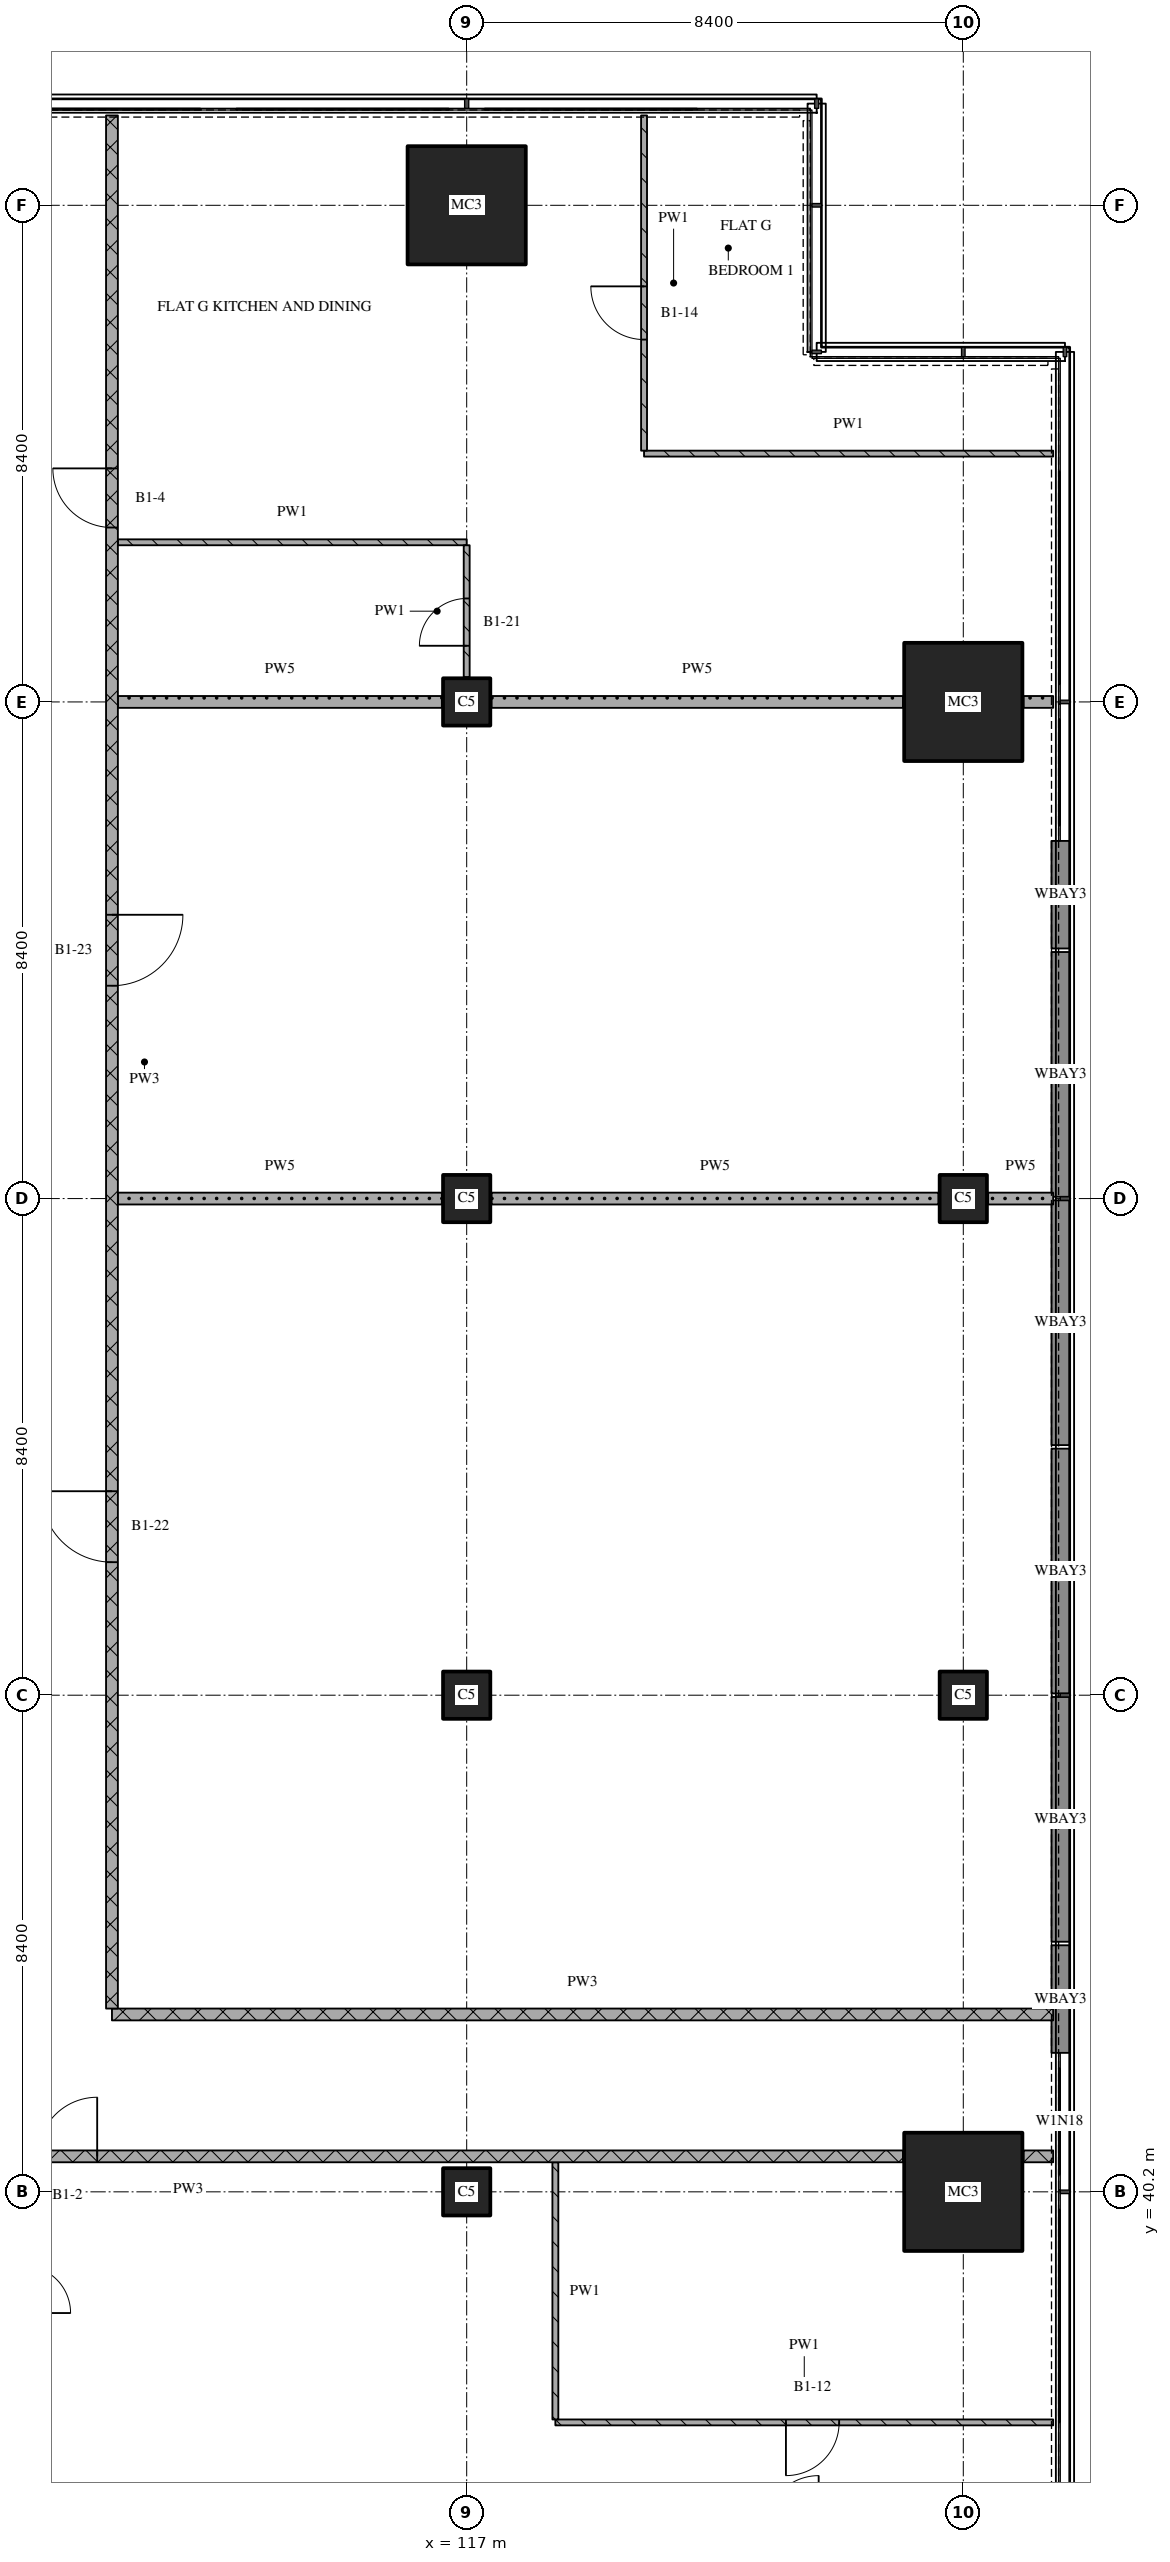
"""IFC4 building model, lengths in metres.
Left out: names, types, materials, properties, quantities, classifications, styles, units other than length and angle.
Written with IfcOpenShell. Run it as: python <this file> out.ifc"""

import sys

from ifc_helpers import new_model, si_unit, direction, frame, frame_2d, origin, origin_2d, place, context, subcontext, project, spatial, rectangle, extrude, element, fill, save


model = new_model("IFC4")
c1 = context("Model", 3, precision=1e-05, world=origin(), true_north=direction((0.0, 1.0)))
c2 = subcontext(c1, "Body", "Model", "MODEL_VIEW")
j1 = project(units=[si_unit("LENGTHUNIT", "METRE"), si_unit("PLANEANGLEUNIT", "RADIAN")], contexts=[c1])
p1 = place(None, origin())
s1 = spatial("IfcSite", under=j1, at=p1, CompositionType="ELEMENT")
p2 = place(p1, origin())
s2 = spatial("IfcBuilding", under=s1, at=p2, CompositionType="ELEMENT")
p3 = place(p2, frame((0.0, 0.0, 95.25)))
s3 = spatial("IfcBuildingStorey", under=s2, at=p3, CompositionType="ELEMENT", Elevation=95.25)
for number, where, z_axis, x_axis in (
    (1, (117.0, 40.2, 0.0), (0.0, 0.0, 1.0), (1.0, 0.0, 0.0)),
    (2, (117.0, 48.6, 0.0), (0.0, 0.0, 1.0), (1.0, 0.0, 0.0)),
    (3, (117.0, 57.0, 0.0), (0.0, 0.0, 1.0), (1.0, 0.0, 0.0)),
    (4, (117.0, 65.4, 0.0), (0.0, 0.0, 1.0), (1.0, 0.0, 0.0)),
):
    element("IfcColumn", number, at=place(p3, frame(where, z_axis=z_axis, x_axis=x_axis)), inside=s3, PredefinedType="COLUMN", context=c2, shape_type="SweptSolid", body=[
        extrude(rectangle(XDim=0.8, YDim=0.8, at=origin_2d()), origin(), (0.0, 0.0, 1.0), 3.6),
    ])
for number, where, z_axis, x_axis in (
    (5, (117.0, 73.8, 0.0), (0.0, 0.0, 1.0), (1.0, 0.0, 0.0)),
    (6, (125.4, 40.2, 0.0), (0.0, 0.0, 1.0), (1.0, 0.0, 0.0)),
):
    element("IfcColumn", number, at=place(p3, frame(where, z_axis=z_axis, x_axis=x_axis)), inside=s3, PredefinedType="COLUMN", context=c2, shape_type="SweptSolid", body=[
        extrude(rectangle(XDim=2.0, YDim=2.0, at=origin_2d()), origin(), (0.0, 0.0, 1.0), 3.6),
    ])
for number, where, z_axis, x_axis in (
    (7, (125.4, 48.6, 0.0), (0.0, 0.0, 1.0), (1.0, 0.0, 0.0)),
    (8, (125.4, 57.0, 0.0), (0.0, 0.0, 1.0), (1.0, 0.0, 0.0)),
):
    element("IfcColumn", number, at=place(p3, frame(where, z_axis=z_axis, x_axis=x_axis)), inside=s3, PredefinedType="COLUMN", context=c2, shape_type="SweptSolid", body=[
        extrude(rectangle(XDim=0.8, YDim=0.8, at=origin_2d()), origin(), (0.0, 0.0, 1.0), 3.6),
    ])
p4 = place(p3, frame((125.4, 65.4, 0.0), z_axis=(0.0, 0.0, 1.0), x_axis=(1.0, 0.0, 0.0)))
e9 = element("IfcColumn", 9, at=p4, inside=s3, PredefinedType="COLUMN", context=c2, shape_type="SweptSolid", body=[
    extrude(rectangle(XDim=2.0, YDim=2.0, at=origin_2d()), origin(), (0.0, 0.0, 1.0), 3.6),
])
p5 = place(p3, frame((127.046, 44.37, 0.0), z_axis=(0.0, 0.0, 1.0), x_axis=(0.0, -1.0, 0.0)))
e10 = element("IfcWall", 10, at=p5, inside=s3, PredefinedType="SOLIDWALL", context=c2, shape_type="SweptSolid", body=[
    extrude(rectangle(XDim=1.819, YDim=0.308, at=frame_2d((0.91, 0.0))), origin(), (0.0, 0.0, 1.0), 3.2),
])
for number, where, z_axis, x_axis in (
    (11, (127.046, 48.57, 0.0), (0.0, 0.0, 1.0), (0.0, -1.0, 0.0)),
    (12, (127.046, 52.77, 0.0), (0.0, 0.0, 1.0), (0.0, -1.0, 0.0)),
):
    element("IfcWall", number, at=place(p3, frame(where, z_axis=z_axis, x_axis=x_axis)), inside=s3, PredefinedType="SOLIDWALL", context=c2, shape_type="SweptSolid", body=[
        extrude(rectangle(XDim=4.14, YDim=0.308, at=frame_2d((2.07, 0.0))), origin(), (0.0, 0.0, 1.0), 3.2),
    ])
for number, where, z_axis, x_axis in (
    (13, (127.046, 56.97, 0.0), (0.0, 0.0, 1.0), (0.0, -1.0, 0.0)),
    (14, (127.046, 61.17, 0.0), (0.0, 0.0, 1.0), (0.0, -1.0, 0.0)),
):
    element("IfcWall", number, at=place(p3, frame(where, z_axis=z_axis, x_axis=x_axis)), inside=s3, PredefinedType="SOLIDWALL", context=c2, shape_type="SweptSolid", body=[
        extrude(rectangle(XDim=4.14, YDim=0.308, at=frame_2d((2.07, 0.0))), origin(), (0.0, 0.0, 1.0), 3.2),
    ])
p6 = place(p3, frame((127.046, 63.049, 0.0), z_axis=(0.0, 0.0, 1.0), x_axis=(0.0, -1.0, 0.0)))
e15 = element("IfcWall", 15, at=p6, inside=s3, PredefinedType="SOLIDWALL", context=c2, shape_type="SweptSolid", body=[
    extrude(rectangle(XDim=1.819, YDim=0.308, at=frame_2d((0.91, 0.0))), origin(), (0.0, 0.0, 1.0), 3.2),
])
p7 = place(p3, frame((118.5, 36.3, 0.0), z_axis=(0.0, 0.0, 1.0), x_axis=(1.0, 0.0, 0.0)))
e16 = element("IfcWall", 16, at=p7, inside=s3, PredefinedType="PARTITIONING", context=c2, shape_type="SweptSolid", body=[
    extrude(rectangle(XDim=8.42, YDim=0.1, at=frame_2d((4.21, 0.0))), origin(), (0.0, 0.0, 1.0), 3.32),
])
p8 = place(p7, frame((3.9, 0.0, 0.0)))
e17 = element("IfcOpeningElement", 17, at=p8, cuts=e16, PredefinedType="OPENING", context=c2, shape_type="SweptSolid", body=[
    extrude(rectangle(XDim=0.9, YDim=2.1, at=frame_2d((0.45, 1.05))), frame((0.0, 0.06, 0.0), z_axis=(0.0, -1.0, 0.0), x_axis=(1.0, 0.0, 0.0)), (0.0, 0.0, 1.0), 0.12),
])
p9 = place(p3, frame((124.38, 40.8, 0.0), z_axis=(0.0, 0.0, 1.0), x_axis=(-1.0, 0.0, 0.0)))
e18 = element("IfcWall", 18, at=p9, inside=s3, PredefinedType="PARTITIONING", context=c2, shape_type="SweptSolid", body=[
    extrude(rectangle(XDim=24.18, YDim=0.2, at=frame_2d((12.09, 0.0))), origin(), (0.0, 0.0, 1.0), 3.32),
])
p10 = place(p9, frame((13.63, 0.0, 0.0)))
e19 = element("IfcOpeningElement", 19, at=p10, cuts=e18, PredefinedType="OPENING", context=c2, shape_type="SweptSolid", body=[
    extrude(rectangle(XDim=1.0, YDim=2.1, at=frame_2d((0.5, 1.05))), frame((0.0, 0.11, 0.0), z_axis=(0.0, -1.0, 0.0), x_axis=(1.0, 0.0, 0.0)), (0.0, 0.0, 1.0), 0.22),
])
p11 = place(p3, frame((126.42, 40.8, 0.0), z_axis=(0.0, 0.0, 1.0), x_axis=(1.0, 0.0, 0.0)))
e20 = element("IfcWall", 20, at=p11, inside=s3, PredefinedType="PARTITIONING", context=c2, shape_type="SweptSolid", body=[
    extrude(rectangle(XDim=0.5, YDim=0.2, at=frame_2d((0.25, 0.0))), origin(), (0.0, 0.0, 1.0), 3.32),
])
p12 = place(p3, frame((111.0, 43.2, 0.0), z_axis=(0.0, 0.0, 1.0), x_axis=(1.0, 0.0, 0.0)))
e21 = element("IfcWall", 21, at=p12, inside=s3, PredefinedType="PARTITIONING", context=c2, shape_type="SweptSolid", body=[
    extrude(rectangle(XDim=15.92, YDim=0.2, at=frame_2d((7.96, 0.0))), origin(), (0.0, 0.0, 1.0), 3.32),
])
p13 = place(p3, frame((111.1, 57.0, 0.0), z_axis=(0.0, 0.0, 1.0), x_axis=(1.0, 0.0, 0.0)))
e22 = element("IfcWall", 22, at=p13, inside=s3, PredefinedType="PARTITIONING", context=c2, shape_type="SweptSolid", body=[
    extrude(rectangle(XDim=5.48, YDim=0.2, at=frame_2d((2.74, 0.0))), origin(), (0.0, 0.0, 1.0), 3.32),
])
p14 = place(p3, frame((117.42, 57.0, 0.0), z_axis=(0.0, 0.0, 1.0), x_axis=(1.0, 0.0, 0.0)))
e23 = element("IfcWall", 23, at=p14, inside=s3, PredefinedType="PARTITIONING", context=c2, shape_type="SweptSolid", body=[
    extrude(rectangle(XDim=7.56, YDim=0.2, at=frame_2d((3.78, 0.0))), origin(), (0.0, 0.0, 1.0), 3.32),
])
p15 = place(p3, frame((125.82, 57.0, 0.0), z_axis=(0.0, 0.0, 1.0), x_axis=(1.0, 0.0, 0.0)))
e24 = element("IfcWall", 24, at=p15, inside=s3, PredefinedType="PARTITIONING", context=c2, shape_type="SweptSolid", body=[
    extrude(rectangle(XDim=1.1, YDim=0.2, at=frame_2d((0.55, 0.0))), origin(), (0.0, 0.0, 1.0), 3.32),
])
p16 = place(p3, frame((111.1, 65.4, 0.0), z_axis=(0.0, 0.0, 1.0), x_axis=(1.0, 0.0, 0.0)))
e25 = element("IfcWall", 25, at=p16, inside=s3, PredefinedType="PARTITIONING", context=c2, shape_type="SweptSolid", body=[
    extrude(rectangle(XDim=5.48, YDim=0.2, at=frame_2d((2.74, 0.0))), origin(), (0.0, 0.0, 1.0), 2.82),
])
p17 = place(p3, frame((117.42, 65.4, 0.0), z_axis=(0.0, 0.0, 1.0), x_axis=(1.0, 0.0, 0.0)))
e26 = element("IfcWall", 26, at=p17, inside=s3, PredefinedType="PARTITIONING", context=c2, shape_type="SweptSolid", body=[
    extrude(rectangle(XDim=6.96, YDim=0.2, at=frame_2d((3.48, 0.0))), origin(), (0.0, 0.0, 1.0), 3.32),
])
p18 = place(p3, frame((126.42, 65.4, 0.0), z_axis=(0.0, 0.0, 1.0), x_axis=(1.0, 0.0, 0.0)))
e27 = element("IfcWall", 27, at=p18, inside=s3, PredefinedType="PARTITIONING", context=c2, shape_type="SweptSolid", body=[
    extrude(rectangle(XDim=0.5, YDim=0.2, at=frame_2d((0.25, 0.0))), origin(), (0.0, 0.0, 1.0), 3.32),
])
p19 = place(p3, frame((111.1, 68.1, 0.0), z_axis=(0.0, 0.0, 1.0), x_axis=(1.0, 0.0, 0.0)))
e28 = element("IfcWall", 28, at=p19, inside=s3, PredefinedType="PARTITIONING", context=c2, shape_type="SweptSolid", body=[
    extrude(rectangle(XDim=5.9, YDim=0.1, at=frame_2d((2.95, 0.0))), origin(), (0.0, 0.0, 1.0), 3.32),
])
p20 = place(p3, frame((120.0, 69.6, 0.0), z_axis=(0.0, 0.0, 1.0), x_axis=(1.0, 0.0, 0.0)))
e29 = element("IfcWall", 29, at=p20, inside=s3, PredefinedType="PARTITIONING", context=c2, shape_type="SweptSolid", body=[
    extrude(rectangle(XDim=6.92, YDim=0.1, at=frame_2d((3.46, 0.0))), origin(), (0.0, 0.0, 1.0), 3.32),
])
p21 = place(p3, frame((111.0, 75.32, 0.0), z_axis=(0.0, 0.0, 1.0), x_axis=(0.0, -1.0, 0.0)))
e30 = element("IfcWall", 30, at=p21, inside=s3, PredefinedType="PARTITIONING", context=c2, shape_type="SweptSolid", body=[
    extrude(rectangle(XDim=32.02, YDim=0.2, at=frame_2d((16.01, 0.0))), origin(), (0.0, 0.0, 1.0), 3.32),
])
p22 = place(p21, frame((5.97, 0.0, 0.0)))
e31 = element("IfcOpeningElement", 31, at=p22, cuts=e30, PredefinedType="OPENING", context=c2, shape_type="SweptSolid", body=[
    extrude(rectangle(XDim=1.0, YDim=2.1, at=frame_2d((0.5, 1.05))), frame((0.0, 0.11, 0.0), z_axis=(0.0, -1.0, 0.0), x_axis=(1.0, 0.0, 0.0)), (0.0, 0.0, 1.0), 0.22),
])
p23 = place(p21, frame((13.52, 0.0, 0.0)))
e32 = element("IfcOpeningElement", 32, at=p23, cuts=e30, PredefinedType="OPENING", context=c2, shape_type="SweptSolid", body=[
    extrude(rectangle(XDim=1.2, YDim=2.1, at=frame_2d((0.6, 1.05))), frame((0.0, 0.11, 0.0), z_axis=(0.0, -1.0, 0.0), x_axis=(1.0, 0.0, 0.0)), (0.0, 0.0, 1.0), 0.22),
])
p24 = place(p21, frame((23.27, 0.0, 0.0)))
e33 = element("IfcOpeningElement", 33, at=p24, cuts=e30, PredefinedType="OPENING", context=c2, shape_type="SweptSolid", body=[
    extrude(rectangle(XDim=1.2, YDim=2.1, at=frame_2d((0.6, 1.05))), frame((0.0, 0.11, 0.0), z_axis=(0.0, -1.0, 0.0), x_axis=(1.0, 0.0, 0.0)), (0.0, 0.0, 1.0), 0.22),
])
p25 = place(p3, frame((117.0, 65.82, 0.0), z_axis=(0.0, 0.0, 1.0), x_axis=(0.0, 1.0, 0.0)))
e34 = element("IfcWall", 34, at=p25, inside=s3, PredefinedType="PARTITIONING", context=c2, shape_type="SweptSolid", body=[
    extrude(rectangle(XDim=2.23, YDim=0.1, at=frame_2d((1.115, 0.0))), origin(), (0.0, 0.0, 1.0), 3.32),
])
p26 = place(p25, frame((0.53, 0.0, 0.0)))
e35 = element("IfcOpeningElement", 35, at=p26, cuts=e34, PredefinedType="OPENING", context=c2, shape_type="SweptSolid", body=[
    extrude(rectangle(XDim=0.8, YDim=2.1, at=frame_2d((0.4, 1.05))), frame((0.0, 0.06, 0.0), z_axis=(0.0, -1.0, 0.0), x_axis=(1.0, 0.0, 0.0)), (0.0, 0.0, 1.0), 0.12),
])
p27 = place(p3, frame((118.5, 40.7, 0.0), z_axis=(0.0, 0.0, 1.0), x_axis=(0.0, -1.0, 0.0)))
e36 = element("IfcWall", 36, at=p27, inside=s3, PredefinedType="PARTITIONING", context=c2, shape_type="SweptSolid", body=[
    extrude(rectangle(XDim=4.35, YDim=0.1, at=frame_2d((2.175, 0.0))), origin(), (0.0, 0.0, 1.0), 3.32),
])
p28 = place(p3, frame((120.0, 75.32, 0.0), z_axis=(0.0, 0.0, 1.0), x_axis=(0.0, -1.0, 0.0)))
e37 = element("IfcWall", 37, at=p28, inside=s3, PredefinedType="PARTITIONING", context=c2, shape_type="SweptSolid", body=[
    extrude(rectangle(XDim=5.67, YDim=0.1, at=frame_2d((2.835, 0.0))), origin(), (0.0, 0.0, 1.0), 3.32),
])
p29 = place(p28, frame((2.891, 0.0, 0.0)))
e38 = element("IfcOpeningElement", 38, at=p29, cuts=e37, PredefinedType="OPENING", context=c2, shape_type="SweptSolid", body=[
    extrude(rectangle(XDim=0.9, YDim=2.1, at=frame_2d((0.45, 1.05))), frame((0.0, 0.06, 0.0), z_axis=(0.0, -1.0, 0.0), x_axis=(1.0, 0.0, 0.0)), (0.0, 0.0, 1.0), 0.12),
])
p30 = place(p8, origin())
e39 = element("IfcDoor", 39, at=p30, inside=s3, OperationType="SINGLE_SWING_RIGHT", PredefinedType="DOOR", context=c2, shape_type="SweptSolid", body=[
    extrude(rectangle(XDim=0.9, YDim=2.1, at=frame_2d((0.45, 1.05))), frame((0.0, 0.025, 0.0), z_axis=(0.0, -1.0, 0.0), x_axis=(1.0, 0.0, 0.0)), (0.0, 0.0, 1.0), 0.05),
])
fill(e17, e39)
p31 = place(p10, origin())
e40 = element("IfcDoor", 40, at=p31, inside=s3, OperationType="SINGLE_SWING_RIGHT", PredefinedType="DOOR", context=c2, shape_type="SweptSolid", body=[
    extrude(rectangle(XDim=1.0, YDim=2.1, at=frame_2d((0.5, 1.05))), frame((0.0, 0.025, 0.0), z_axis=(0.0, -1.0, 0.0), x_axis=(1.0, 0.0, 0.0)), (0.0, 0.0, 1.0), 0.05),
])
fill(e19, e40)
p32 = place(p22, origin())
e41 = element("IfcDoor", 41, at=p32, inside=s3, OperationType="SINGLE_SWING_RIGHT", PredefinedType="DOOR", context=c2, shape_type="SweptSolid", body=[
    extrude(rectangle(XDim=1.0, YDim=2.1, at=frame_2d((0.5, 1.05))), frame((0.0, 0.025, 0.0), z_axis=(0.0, -1.0, 0.0), x_axis=(1.0, 0.0, 0.0)), (0.0, 0.0, 1.0), 0.05),
])
fill(e31, e41)
p33 = place(p23, origin())
e42 = element("IfcDoor", 42, at=p33, inside=s3, OperationType="SINGLE_SWING_LEFT", PredefinedType="DOOR", context=c2, shape_type="SweptSolid", body=[
    extrude(rectangle(XDim=1.2, YDim=2.1, at=frame_2d((0.6, 1.05))), frame((0.0, 0.025, 0.0), z_axis=(0.0, -1.0, 0.0), x_axis=(1.0, 0.0, 0.0)), (0.0, 0.0, 1.0), 0.05),
])
fill(e32, e42)
p34 = place(p24, origin())
e43 = element("IfcDoor", 43, at=p34, inside=s3, OperationType="SINGLE_SWING_RIGHT", PredefinedType="DOOR", context=c2, shape_type="SweptSolid", body=[
    extrude(rectangle(XDim=1.2, YDim=2.1, at=frame_2d((0.6, 1.05))), frame((0.0, 0.025, 0.0), z_axis=(0.0, -1.0, 0.0), x_axis=(1.0, 0.0, 0.0)), (0.0, 0.0, 1.0), 0.05),
])
fill(e33, e43)
p35 = place(p26, origin())
e44 = element("IfcDoor", 44, at=p35, inside=s3, OperationType="SINGLE_SWING_LEFT", PredefinedType="DOOR", context=c2, shape_type="SweptSolid", body=[
    extrude(rectangle(XDim=0.8, YDim=2.1, at=frame_2d((0.4, 1.05))), frame((0.0, 0.025, 0.0), z_axis=(0.0, -1.0, 0.0), x_axis=(1.0, 0.0, 0.0)), (0.0, 0.0, 1.0), 0.05),
])
fill(e35, e44)
p36 = place(p29, origin())
e45 = element("IfcDoor", 45, at=p36, inside=s3, OperationType="SINGLE_SWING_RIGHT", PredefinedType="DOOR", context=c2, shape_type="SweptSolid", body=[
    extrude(rectangle(XDim=0.9, YDim=2.1, at=frame_2d((0.45, 1.05))), frame((0.0, 0.025, 0.0), z_axis=(0.0, -1.0, 0.0), x_axis=(1.0, 0.0, 0.0)), (0.0, 0.0, 1.0), 0.05),
])
fill(e38, e45)
save(model, sys.argv[1])
